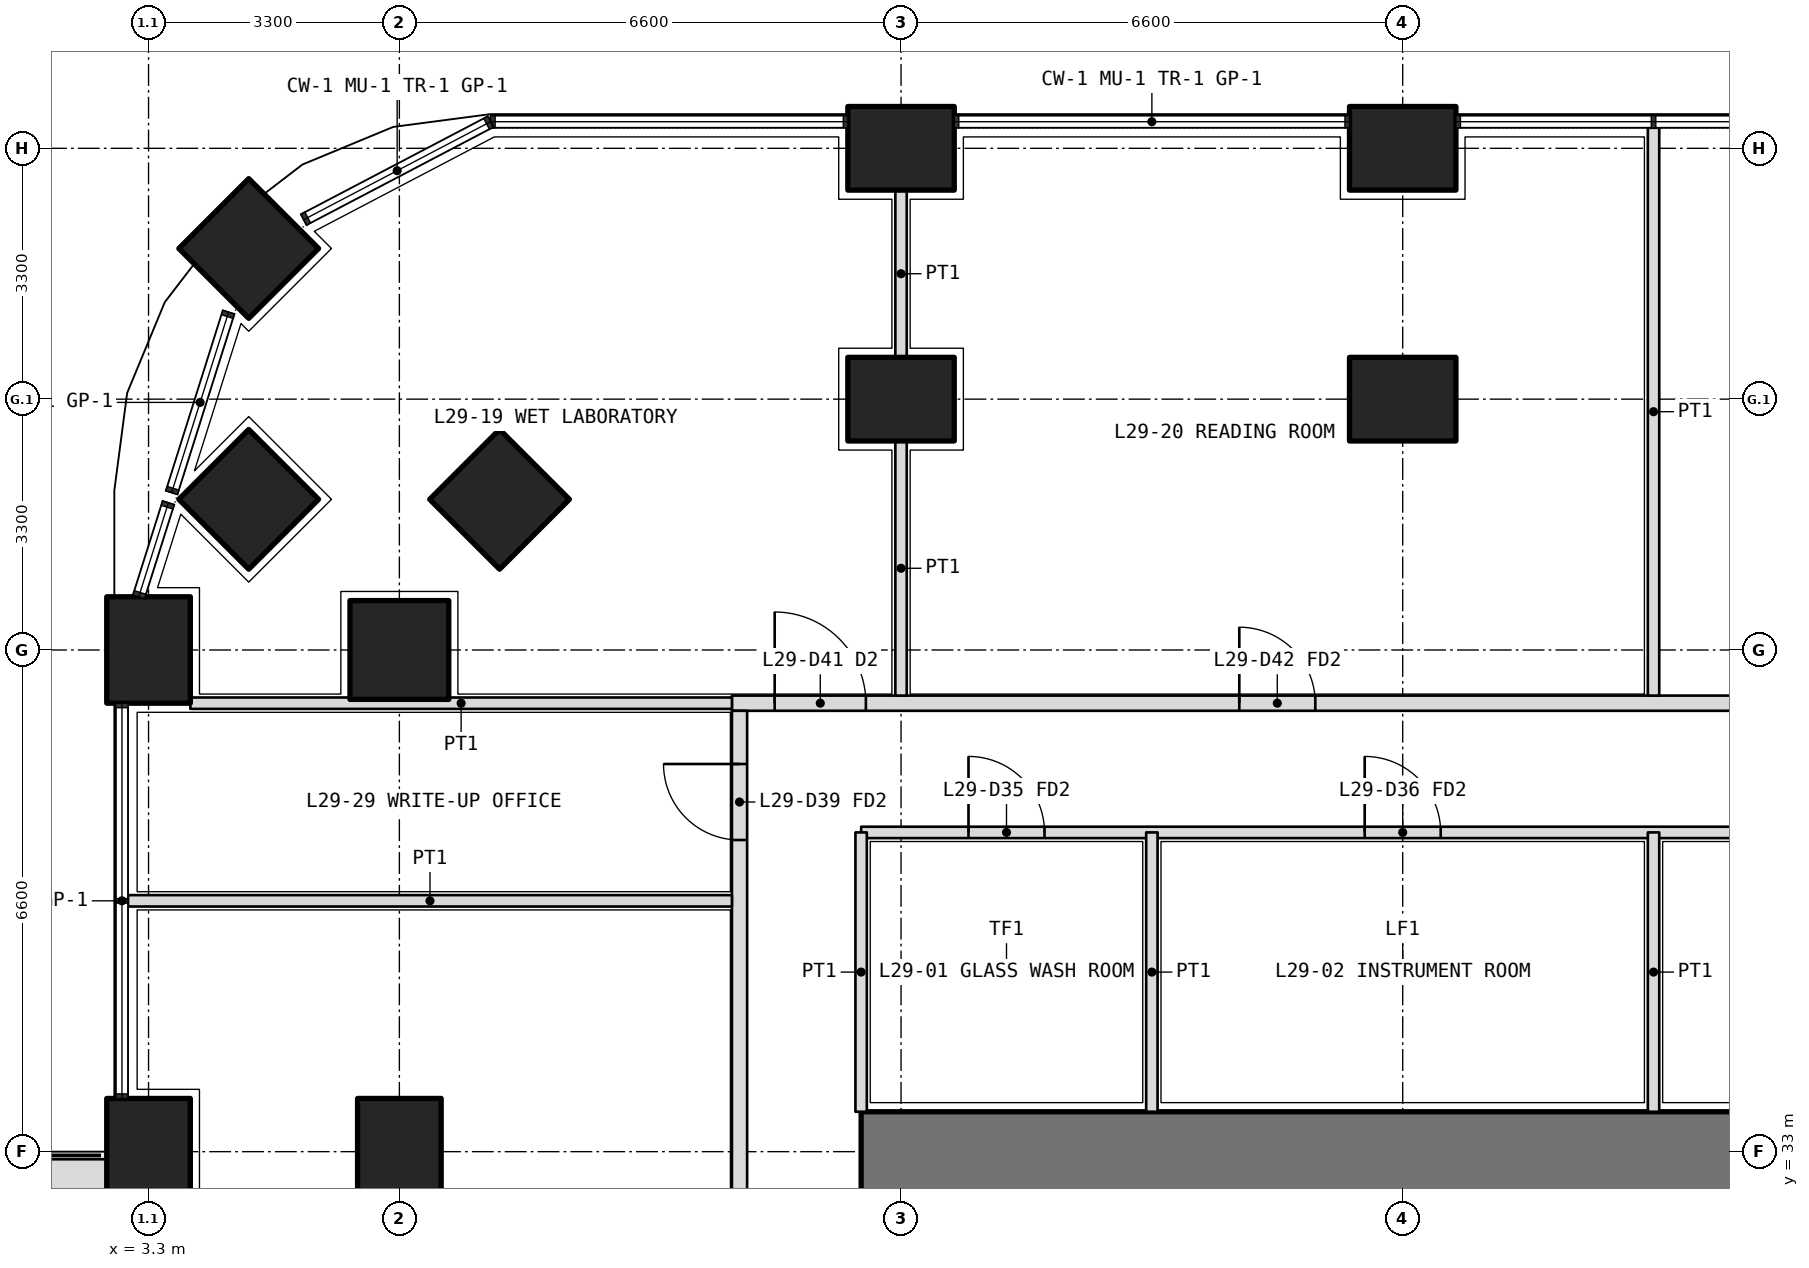
"""IFC4 building model, lengths in metres.
Left out: names, types, materials, properties, quantities, classifications, styles, units other than length and angle.
Written with IfcOpenShell. Run it as: python <this file> out.ifc"""

import sys

from ifc_helpers import new_model, si_unit, direction, frame, frame_2d, origin, origin_2d, place, context, subcontext, project, spatial, polyline, rectangle, outline, extrude, element, fill, save


model = new_model("IFC4")
c1 = context("Model", 3, precision=1e-05, world=origin(), true_north=direction((0.0, 1.0)))
c2 = subcontext(c1, "Body", "Model", "MODEL_VIEW")
j1 = project(units=[si_unit("LENGTHUNIT", "METRE"), si_unit("PLANEANGLEUNIT", "RADIAN")], contexts=[c1])
p1 = place(None, origin())
s1 = spatial("IfcSite", under=j1, at=p1, CompositionType="ELEMENT")
p2 = place(p1, origin())
s2 = spatial("IfcBuilding", under=s1, at=p2, CompositionType="ELEMENT")
p3 = place(p2, frame((0.0, 0.0, 128.4)))
s3 = spatial("IfcBuildingStorey", under=s2, at=p3, CompositionType="ELEMENT", Elevation=128.4)
p4 = place(p3, frame((4.618, 44.882, 0.0), z_axis=(0.0, 0.0, 1.0), x_axis=(0.707106781187, 0.707106781187, 0.0)))
e1 = element("IfcColumn", 1, at=p4, inside=s3, PredefinedType="COLUMN", context=c2, shape_type="SweptSolid", body=[
    extrude(rectangle(XDim=1.3, YDim=1.3, at=origin_2d()), origin(), (0.0, 0.0, 1.0), 4.2),
])
for number, where, z_axis, x_axis in (
    (2, (3.3, 33.0, 0.0), (0.0, 0.0, 1.0), (0.0, 1.0, 0.0)),
    (3, (3.3, 39.6, 0.0), (0.0, 0.0, 1.0), (0.0, 1.0, 0.0)),
    (4, (13.2, 46.2, 0.0), (0.0, 0.0, 1.0), (1.0, 0.0, 0.0)),
    (5, (19.8, 46.2, 0.0), (0.0, 0.0, 1.0), (1.0, 0.0, 0.0)),
):
    element("IfcColumn", number, at=place(p3, frame(where, z_axis=z_axis, x_axis=x_axis)), inside=s3, PredefinedType="COLUMN", context=c2, shape_type="SweptSolid", body=[
        extrude(rectangle(XDim=1.4, YDim=1.1, at=origin_2d()), origin(), (0.0, 0.0, 1.0), 4.2),
    ])
for number, where, z_axis, x_axis in (
    (6, (6.6, 39.6, 0.0), (0.0, 0.0, 1.0), (1.0, 0.0, 0.0)),
    (7, (4.618, 41.582, 0.0), (0.0, 0.0, 1.0), (0.707, 0.707, 0.0)),
):
    element("IfcColumn", number, at=place(p3, frame(where, z_axis=z_axis, x_axis=x_axis)), inside=s3, PredefinedType="COLUMN", context=c2, shape_type="SweptSolid", body=[
        extrude(rectangle(XDim=1.3, YDim=1.3, at=origin_2d()), origin(), (0.0, 0.0, 1.0), 4.2),
    ])
for number, where, z_axis, x_axis in (
    (8, (13.2, 42.9, 0.0), (0.0, 0.0, 1.0), (1.0, 0.0, 0.0)),
    (9, (19.8, 42.9, 0.0), (0.0, 0.0, 1.0), (1.0, 0.0, 0.0)),
):
    element("IfcColumn", number, at=place(p3, frame(where, z_axis=z_axis, x_axis=x_axis)), inside=s3, PredefinedType="COLUMN", context=c2, shape_type="SweptSolid", body=[
        extrude(rectangle(XDim=1.4, YDim=1.1, at=origin_2d()), origin(), (0.0, 0.0, 1.0), 4.2),
    ])
p5 = place(p3, frame((7.918, 41.582, 0.0), z_axis=(0.0, 0.0, 1.0), x_axis=(0.707106781187, 0.707106781187, 0.0)))
e10 = element("IfcColumn", 10, at=p5, inside=s3, PredefinedType="COLUMN", context=c2, shape_type="SweptSolid", body=[
    extrude(rectangle(XDim=1.3, YDim=1.3, at=origin_2d()), origin(), (0.0, 0.0, 1.0), 4.2),
])
p6 = place(p3, frame((6.6, 33.0, 0.0), z_axis=(0.0, 0.0, 1.0), x_axis=(0.0, 1.0, 0.0)))
e11 = element("IfcColumn", 11, at=p6, inside=s3, PredefinedType="COLUMN", context=c2, shape_type="SweptSolid", body=[
    extrude(rectangle(XDim=1.4, YDim=1.1, at=origin_2d()), origin(), (0.0, 0.0, 1.0), 4.2),
])
p7 = place(p3, origin())
e12 = element("IfcWall", 12, at=p7, inside=s3, PredefinedType="USERDEFINED", context=c2, shape_type="SweptSolid", body=[
    extrude(outline(polyline([(1.75, 23.85), (2.75, 23.85), (2.75, 32.9), (1.75, 32.9), (1.75, 23.85)]), holes=[polyline([(1.9, 24.0), (2.6, 24.0), (2.6, 32.75), (1.9, 32.75), (1.9, 24.0)])]), origin(), (0.0, 0.0, 1.0), 1.05),
])
p8 = place(p3, frame((40.125, 33.0, 0.0), z_axis=(0.0, 0.0, 1.0), x_axis=(-1.0, 0.0, 0.0)))
e13 = element("IfcWall", 13, at=p8, inside=s3, PredefinedType="SHEAR", context=c2, shape_type="SweptSolid", body=[
    extrude(rectangle(XDim=27.45, YDim=1.05, at=frame_2d((13.725, 0.0))), origin(), (0.0, 0.0, 1.0), 4.2),
])
p9 = place(p3, frame((12.675, 37.2, 0.0), z_axis=(0.0, 0.0, 1.0), x_axis=(1.0, 0.0, 0.0)))
e14 = element("IfcWall", 14, at=p9, inside=s3, PredefinedType="PARTITIONING", context=c2, shape_type="SweptSolid", body=[
    extrude(rectangle(XDim=27.45, YDim=0.15, at=frame_2d((13.725, 0.0))), origin(), (0.0, 0.0, 1.0), 2.85),
])
p10 = place(p9, frame((1.413, 0.0, 0.0)))
e15 = element("IfcOpeningElement", 15, at=p10, cuts=e14, PredefinedType="OPENING", context=c2, shape_type="SweptSolid", body=[
    extrude(rectangle(XDim=1.0, YDim=2.1, at=frame_2d((0.5, 1.05))), frame((0.0, 0.085, 0.0), z_axis=(0.0, -1.0, 0.0), x_axis=(1.0, 0.0, 0.0)), (0.0, 0.0, 1.0), 0.17),
])
p11 = place(p9, frame((6.625, 0.0, 0.0)))
e16 = element("IfcOpeningElement", 16, at=p11, cuts=e14, PredefinedType="OPENING", context=c2, shape_type="SweptSolid", body=[
    extrude(rectangle(XDim=1.0, YDim=2.1, at=frame_2d((0.5, 1.05))), frame((0.0, 0.085, 0.0), z_axis=(0.0, -1.0, 0.0), x_axis=(1.0, 0.0, 0.0)), (0.0, 0.0, 1.0), 0.17),
])
p12 = place(p9, frame((14.875, 0.0, 0.0)))
e17 = element("IfcOpeningElement", 17, at=p12, cuts=e14, PredefinedType="OPENING", context=c2, shape_type="SweptSolid", body=[
    extrude(rectangle(XDim=1.0, YDim=2.1, at=frame_2d((0.5, 1.05))), frame((0.0, 0.085, 0.0), z_axis=(0.0, -1.0, 0.0), x_axis=(1.0, 0.0, 0.0)), (0.0, 0.0, 1.0), 0.17),
])
p13 = place(p9, frame((23.387, 0.0, 0.0)))
e18 = element("IfcOpeningElement", 18, at=p13, cuts=e14, PredefinedType="OPENING", context=c2, shape_type="SweptSolid", body=[
    extrude(rectangle(XDim=1.0, YDim=2.1, at=frame_2d((0.5, 1.05))), frame((0.0, 0.085, 0.0), z_axis=(0.0, -1.0, 0.0), x_axis=(1.0, 0.0, 0.0)), (0.0, 0.0, 1.0), 0.17),
])
p14 = place(p3, frame((12.675, 33.525, 0.0), z_axis=(0.0, 0.0, 1.0), x_axis=(0.0, 1.0, 0.0)))
e19 = element("IfcWall", 19, at=p14, inside=s3, PredefinedType="PARTITIONING", context=c2, shape_type="SweptSolid", body=[
    extrude(rectangle(XDim=3.675, YDim=0.15, at=frame_2d((1.837, 0.0))), origin(), (0.0, 0.0, 1.0), 2.85),
])
for number, where, z_axis, x_axis in (
    (20, (16.5, 33.525, 0.0), (0.0, 0.0, 1.0), (0.0, 1.0, 0.0)),
    (21, (23.1, 33.525, 0.0), (0.0, 0.0, 1.0), (0.0, 1.0, 0.0)),
):
    element("IfcWall", number, at=place(p3, frame(where, z_axis=z_axis, x_axis=x_axis)), inside=s3, PredefinedType="PARTITIONING", context=c2, shape_type="SweptSolid", body=[
        extrude(rectangle(XDim=3.675, YDim=0.15, at=frame_2d((1.837, 0.0))), origin(), (0.0, 0.0, 1.0), 3.9),
    ])
p15 = place(p3, frame((10.975, 38.9, 0.0), z_axis=(0.0, 0.0, 1.0), x_axis=(1.0, 0.0, 0.0)))
e22 = element("IfcWall", 22, at=p15, inside=s3, PredefinedType="PARTITIONING", context=c2, shape_type="SweptSolid", body=[
    extrude(rectangle(XDim=30.85, YDim=0.2, at=frame_2d((15.425, 0.0))), origin(), (0.0, 0.0, 1.0), 2.85),
])
p16 = place(p15, frame((0.562, 0.0, 0.0)))
e23 = element("IfcOpeningElement", 23, at=p16, cuts=e22, PredefinedType="OPENING", context=c2, shape_type="SweptSolid", body=[
    extrude(rectangle(XDim=1.2, YDim=2.1, at=frame_2d((0.6, 1.05))), frame((0.0, 0.11, 0.0), z_axis=(0.0, -1.0, 0.0), x_axis=(1.0, 0.0, 0.0)), (0.0, 0.0, 1.0), 0.22),
])
p17 = place(p15, frame((6.675, 0.0, 0.0)))
e24 = element("IfcOpeningElement", 24, at=p17, cuts=e22, PredefinedType="OPENING", context=c2, shape_type="SweptSolid", body=[
    extrude(rectangle(XDim=1.0, YDim=2.1, at=frame_2d((0.5, 1.05))), frame((0.0, 0.11, 0.0), z_axis=(0.0, -1.0, 0.0), x_axis=(1.0, 0.0, 0.0)), (0.0, 0.0, 1.0), 0.22),
])
p18 = place(p15, frame((16.575, 0.0, 0.0)))
e25 = element("IfcOpeningElement", 25, at=p18, cuts=e22, PredefinedType="OPENING", context=c2, shape_type="SweptSolid", body=[
    extrude(rectangle(XDim=1.0, YDim=2.1, at=frame_2d((0.5, 1.05))), frame((0.0, 0.11, 0.0), z_axis=(0.0, -1.0, 0.0), x_axis=(1.0, 0.0, 0.0)), (0.0, 0.0, 1.0), 0.22),
])
p19 = place(p15, frame((25.887, 0.0, 0.0)))
e26 = element("IfcOpeningElement", 26, at=p19, cuts=e22, PredefinedType="OPENING", context=c2, shape_type="SweptSolid", body=[
    extrude(rectangle(XDim=1.0, YDim=2.1, at=frame_2d((0.5, 1.05))), frame((0.0, 0.11, 0.0), z_axis=(0.0, -1.0, 0.0), x_axis=(1.0, 0.0, 0.0)), (0.0, 0.0, 1.0), 0.22),
])
p20 = place(p3, frame((11.075, 11.175, 0.0), z_axis=(0.0, 0.0, 1.0), x_axis=(0.0, 1.0, 0.0)))
e27 = element("IfcWall", 27, at=p20, inside=s3, PredefinedType="PARTITIONING", context=c2, shape_type="SweptSolid", body=[
    extrude(rectangle(XDim=27.625, YDim=0.2, at=frame_2d((13.812, 0.0))), origin(), (0.0, 0.0, 1.0), 2.85),
])
p21 = place(p20, frame((0.462, 0.0, 0.0)))
e28 = element("IfcOpeningElement", 28, at=p21, cuts=e27, PredefinedType="OPENING", context=c2, shape_type="SweptSolid", body=[
    extrude(rectangle(XDim=1.0, YDim=2.1, at=frame_2d((0.5, 1.05))), frame((0.0, 0.11, 0.0), z_axis=(0.0, -1.0, 0.0), x_axis=(1.0, 0.0, 0.0)), (0.0, 0.0, 1.0), 0.22),
])
p22 = place(p20, frame((2.575, 0.0, 0.0)))
e29 = element("IfcOpeningElement", 29, at=p22, cuts=e27, PredefinedType="OPENING", context=c2, shape_type="SweptSolid", body=[
    extrude(rectangle(XDim=1.0, YDim=2.1, at=frame_2d((0.5, 1.05))), frame((0.0, 0.11, 0.0), z_axis=(0.0, -1.0, 0.0), x_axis=(1.0, 0.0, 0.0)), (0.0, 0.0, 1.0), 0.22),
])
p23 = place(p20, frame((5.65, 0.0, 0.0)))
e30 = element("IfcOpeningElement", 30, at=p23, cuts=e27, PredefinedType="OPENING", context=c2, shape_type="SweptSolid", body=[
    extrude(rectangle(XDim=0.9, YDim=2.1, at=frame_2d((0.45, 1.05))), frame((0.0, 0.11, 0.0), z_axis=(0.0, -1.0, 0.0), x_axis=(1.0, 0.0, 0.0)), (0.0, 0.0, 1.0), 0.22),
])
p24 = place(p20, frame((9.5, 0.0, 0.0)))
e31 = element("IfcOpeningElement", 31, at=p24, cuts=e27, PredefinedType="OPENING", context=c2, shape_type="SweptSolid", body=[
    extrude(rectangle(XDim=0.9, YDim=2.1, at=frame_2d((0.45, 1.05))), frame((0.0, 0.11, 0.0), z_axis=(0.0, -1.0, 0.0), x_axis=(1.0, 0.0, 0.0)), (0.0, 0.0, 1.0), 0.22),
])
p25 = place(p20, frame((13.025, 0.0, 0.0)))
e32 = element("IfcOpeningElement", 32, at=p25, cuts=e27, PredefinedType="OPENING", context=c2, shape_type="SweptSolid", body=[
    extrude(rectangle(XDim=1.0, YDim=2.1, at=frame_2d((0.5, 1.05))), frame((0.0, 0.11, 0.0), z_axis=(0.0, -1.0, 0.0), x_axis=(1.0, 0.0, 0.0)), (0.0, 0.0, 1.0), 0.22),
])
p26 = place(p20, frame((19.675, 0.0, 0.0)))
e33 = element("IfcOpeningElement", 33, at=p26, cuts=e27, PredefinedType="OPENING", context=c2, shape_type="SweptSolid", body=[
    extrude(rectangle(XDim=1.0, YDim=2.1, at=frame_2d((0.5, 1.05))), frame((0.0, 0.11, 0.0), z_axis=(0.0, -1.0, 0.0), x_axis=(1.0, 0.0, 0.0)), (0.0, 0.0, 1.0), 0.22),
])
p27 = place(p20, frame((25.925, 0.0, 0.0)))
e34 = element("IfcOpeningElement", 34, at=p27, cuts=e27, PredefinedType="OPENING", context=c2, shape_type="SweptSolid", body=[
    extrude(rectangle(XDim=1.0, YDim=2.1, at=frame_2d((0.5, 1.05))), frame((0.0, 0.11, 0.0), z_axis=(0.0, -1.0, 0.0), x_axis=(1.0, 0.0, 0.0)), (0.0, 0.0, 1.0), 0.22),
])
p28 = place(p3, frame((3.85, 38.9, 0.0), z_axis=(0.0, 0.0, 1.0), x_axis=(1.0, 0.0, 0.0)))
e35 = element("IfcWall", 35, at=p28, inside=s3, PredefinedType="PARTITIONING", context=c2, shape_type="SweptSolid", body=[
    extrude(rectangle(XDim=7.125, YDim=0.15, at=frame_2d((3.562, 0.0))), origin(), (0.0, 0.0, 1.0), 2.85),
])
p29 = place(p3, frame((13.2, 45.65, 0.0), z_axis=(0.0, 0.0, 1.0), x_axis=(0.0, -1.0, 0.0)))
e36 = element("IfcWall", 36, at=p29, inside=s3, PredefinedType="PARTITIONING", context=c2, shape_type="SweptSolid", body=[
    extrude(rectangle(XDim=2.2, YDim=0.15, at=frame_2d((1.1, 0.0))), origin(), (0.0, 0.0, 1.0), 2.85),
])
p30 = place(p3, frame((13.2, 42.35, 0.0), z_axis=(0.0, 0.0, 1.0), x_axis=(0.0, -1.0, 0.0)))
e37 = element("IfcWall", 37, at=p30, inside=s3, PredefinedType="PARTITIONING", context=c2, shape_type="SweptSolid", body=[
    extrude(rectangle(XDim=3.35, YDim=0.15, at=frame_2d((1.675, 0.0))), origin(), (0.0, 0.0, 1.0), 2.85),
])
p31 = place(p3, frame((23.1, 46.47, 0.0), z_axis=(0.0, 0.0, 1.0), x_axis=(0.0, -1.0, 0.0)))
e38 = element("IfcWall", 38, at=p31, inside=s3, PredefinedType="PARTITIONING", context=c2, shape_type="SweptSolid", body=[
    extrude(rectangle(XDim=7.47, YDim=0.15, at=frame_2d((3.735, 0.0))), origin(), (0.0, 0.0, 1.0), 2.7),
])
p32 = place(p3, frame((3.03, 36.3, 0.0), z_axis=(0.0, 0.0, 1.0), x_axis=(1.0, 0.0, 0.0)))
e39 = element("IfcWall", 39, at=p32, inside=s3, PredefinedType="PARTITIONING", context=c2, shape_type="SweptSolid", body=[
    extrude(rectangle(XDim=7.945, YDim=0.15, at=frame_2d((3.973, 0.0))), origin(), (0.0, 0.0, 1.0), 2.7),
])
p33 = place(p10, origin())
e40 = element("IfcDoor", 40, at=p33, inside=s3, OperationType="SINGLE_SWING_LEFT", PredefinedType="DOOR", context=c2, shape_type="SweptSolid", body=[
    extrude(rectangle(XDim=1.0, YDim=2.1, at=frame_2d((0.5, 1.05))), frame((0.0, 0.025, 0.0), z_axis=(0.0, -1.0, 0.0), x_axis=(1.0, 0.0, 0.0)), (0.0, 0.0, 1.0), 0.05),
])
fill(e15, e40)
p34 = place(p11, origin())
e41 = element("IfcDoor", 41, at=p34, inside=s3, OperationType="SINGLE_SWING_LEFT", PredefinedType="DOOR", context=c2, shape_type="SweptSolid", body=[
    extrude(rectangle(XDim=1.0, YDim=2.1, at=frame_2d((0.5, 1.05))), frame((0.0, 0.025, 0.0), z_axis=(0.0, -1.0, 0.0), x_axis=(1.0, 0.0, 0.0)), (0.0, 0.0, 1.0), 0.05),
])
fill(e16, e41)
p35 = place(p16, origin())
e42 = element("IfcDoor", 42, at=p35, inside=s3, OperationType="DOUBLE_DOOR_SINGLE_SWING", PredefinedType="DOOR", context=c2, shape_type="SweptSolid", body=[
    extrude(rectangle(XDim=1.2, YDim=2.1, at=frame_2d((0.6, 1.05))), frame((0.0, 0.025, 0.0), z_axis=(0.0, -1.0, 0.0), x_axis=(1.0, 0.0, 0.0)), (0.0, 0.0, 1.0), 0.05),
])
fill(e23, e42)
p36 = place(p17, origin())
e43 = element("IfcDoor", 43, at=p36, inside=s3, OperationType="SINGLE_SWING_LEFT", PredefinedType="DOOR", context=c2, shape_type="SweptSolid", body=[
    extrude(rectangle(XDim=1.0, YDim=2.1, at=frame_2d((0.5, 1.05))), frame((0.0, 0.025, 0.0), z_axis=(0.0, -1.0, 0.0), x_axis=(1.0, 0.0, 0.0)), (0.0, 0.0, 1.0), 0.05),
])
fill(e24, e43)
p37 = place(p27, origin())
e44 = element("IfcDoor", 44, at=p37, inside=s3, OperationType="SINGLE_SWING_RIGHT", PredefinedType="DOOR", context=c2, shape_type="SweptSolid", body=[
    extrude(rectangle(XDim=1.0, YDim=2.1, at=frame_2d((0.5, 1.05))), frame((0.0, 0.025, 0.0), z_axis=(0.0, -1.0, 0.0), x_axis=(1.0, 0.0, 0.0)), (0.0, 0.0, 1.0), 0.05),
])
fill(e34, e44)
save(model, sys.argv[1])
